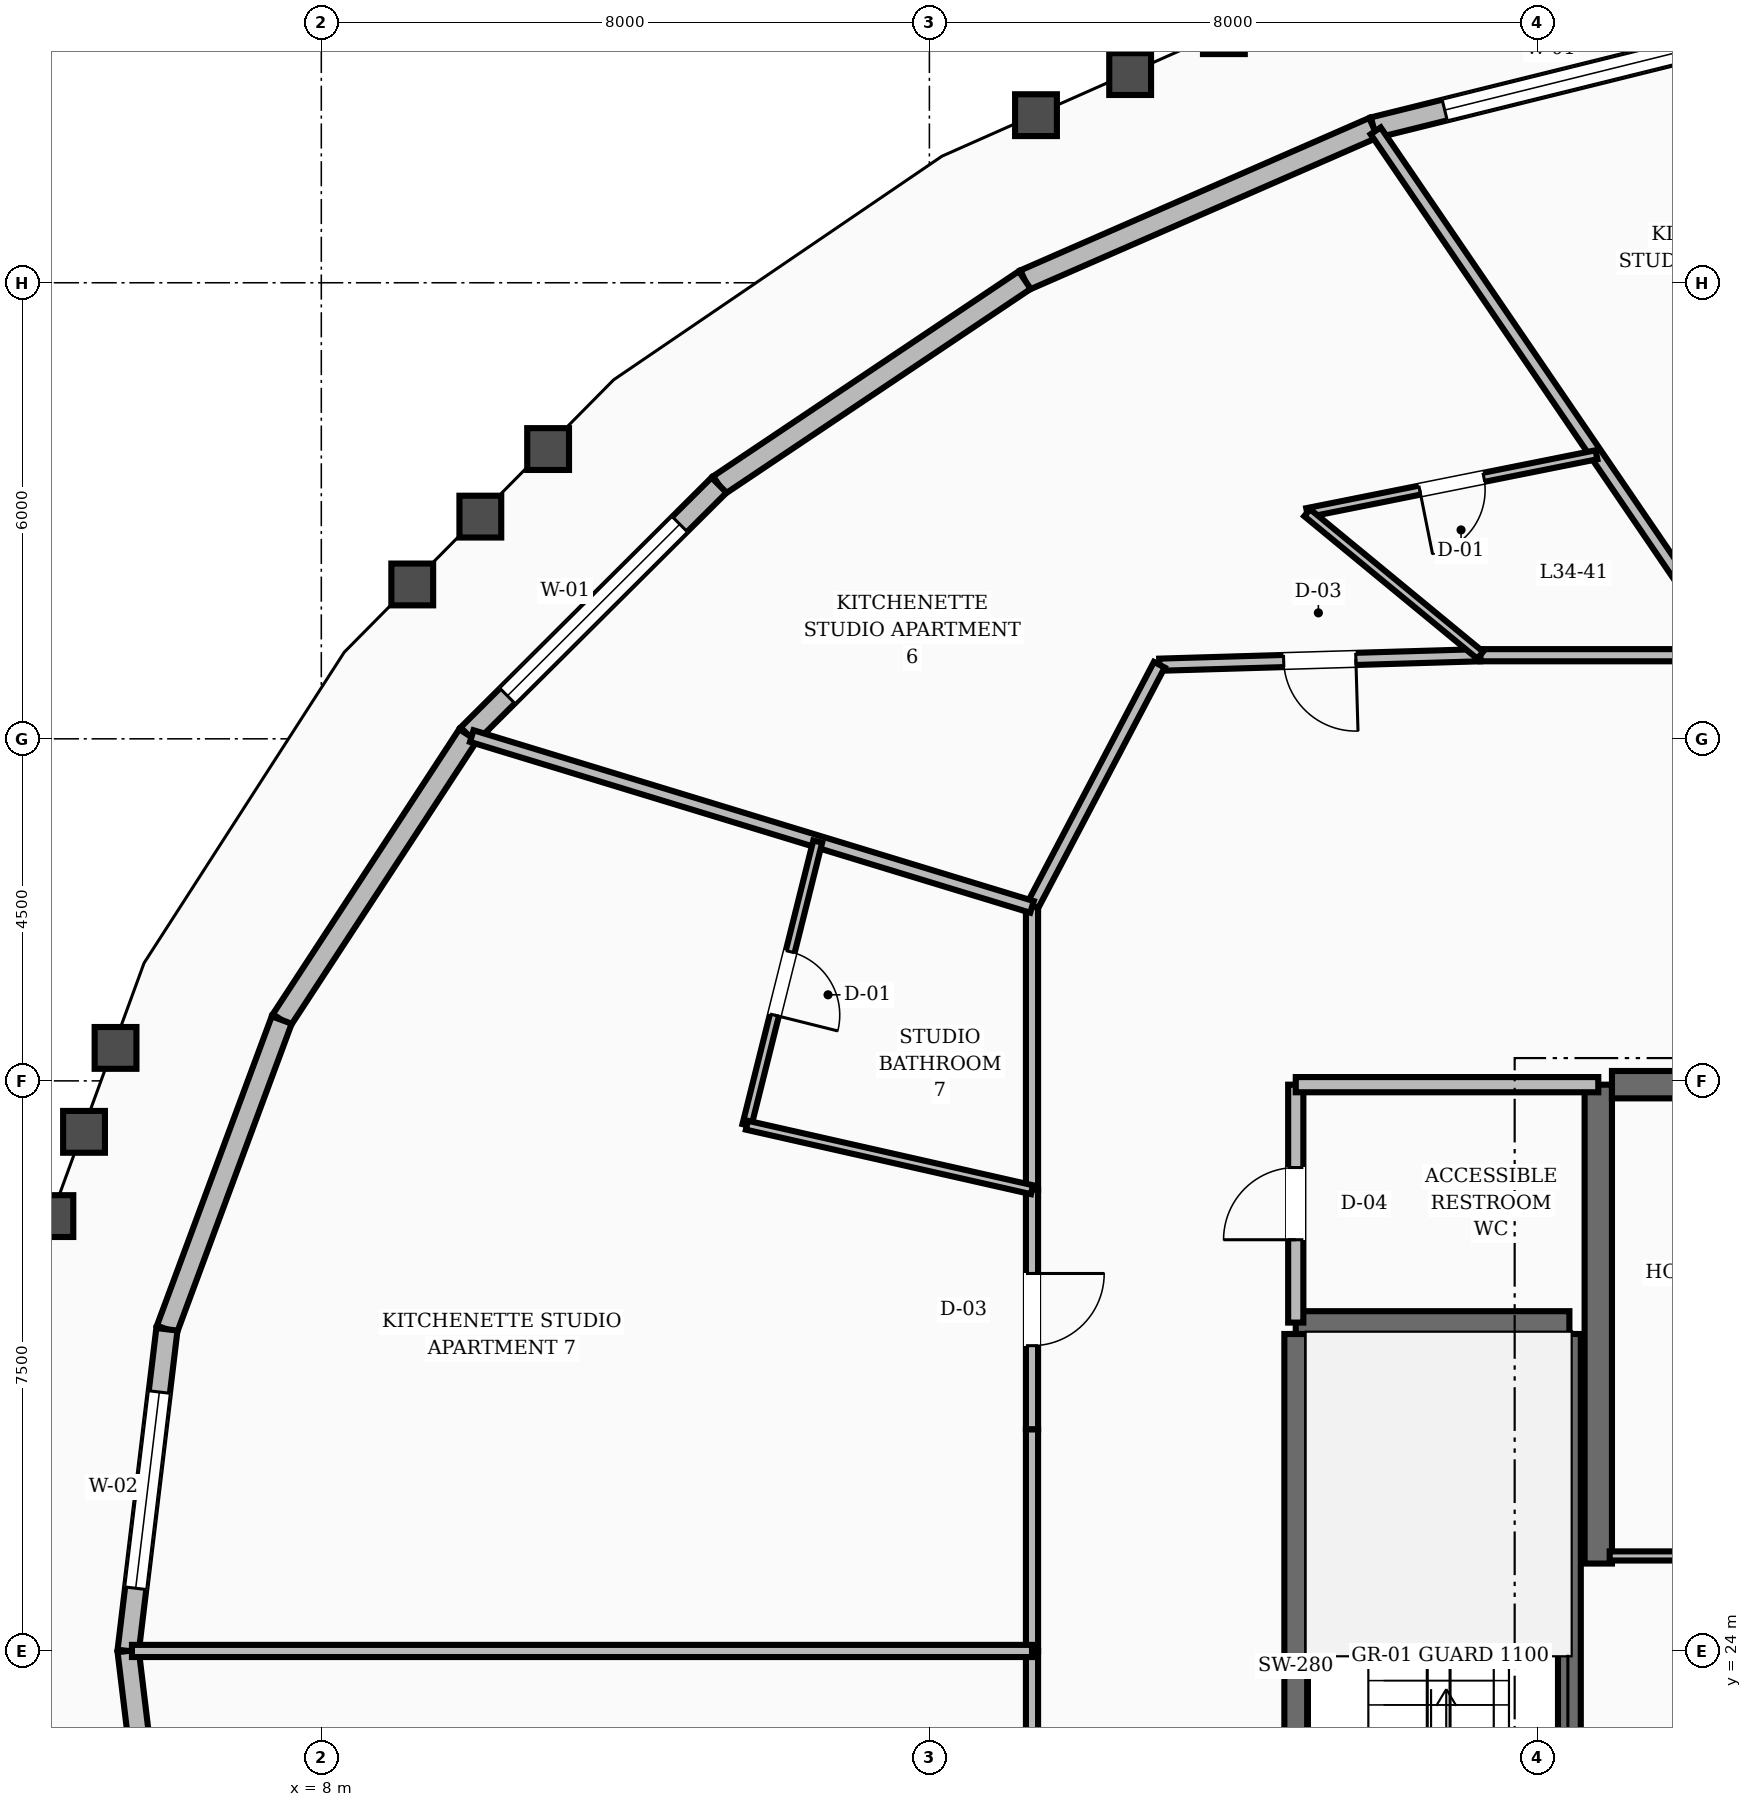
"""IFC4 building model, lengths in metres.
Left out: names, types, materials, properties, quantities, classifications, styles, units other than length and angle.
Written with IfcOpenShell. Run it as: python <this file> out.ifc"""

import sys

from ifc_helpers import new_model, si_unit, direction, frame, frame_2d, origin, place, context, subcontext, project, spatial, rectangle, extrude, element, fill, save


model = new_model("IFC4")
c1 = context("Model", 3, precision=1e-05, world=origin(), true_north=direction((0.0, 1.0)))
c2 = subcontext(c1, "Body", "Model", "MODEL_VIEW")
j1 = project(units=[si_unit("LENGTHUNIT", "METRE"), si_unit("PLANEANGLEUNIT", "RADIAN")], contexts=[c1])
p1 = place(None, origin())
s1 = spatial("IfcSite", under=j1, at=p1, CompositionType="ELEMENT")
p2 = place(p1, origin())
s2 = spatial("IfcBuilding", under=s1, at=p2, CompositionType="ELEMENT")
p3 = place(p2, frame((0.0, 0.0, 135.2)))
s3 = spatial("IfcBuildingStorey", under=s2, at=p3, CompositionType="ELEMENT", Elevation=135.2)
p4 = place(p3, frame((24.8, 25.15, 0.0), z_axis=(0.0, 0.0, 1.0), x_axis=(0.0, 1.0, 0.0)))
e1 = element("IfcWall", 1, at=p4, inside=s3, PredefinedType="SHEAR", context=c2, shape_type="SweptSolid", body=[
    extrude(rectangle(XDim=6.3, YDim=0.36, at=frame_2d((3.15, 0.0))), origin(), (0.0, 0.0, 1.0), 3.6),
])
p5 = place(p3, frame((24.98, 31.45, 0.0), z_axis=(0.0, 0.0, 1.0), x_axis=(1.0, 0.0, 0.0)))
e2 = element("IfcWall", 2, at=p5, inside=s3, PredefinedType="SHEAR", context=c2, shape_type="SweptSolid", body=[
    extrude(rectangle(XDim=3.22, YDim=0.36, at=frame_2d((1.61, 0.0))), origin(), (0.0, 0.0, 1.0), 3.6),
])
for number, where, z_axis, x_axis in (
    (3, (20.82, 19.43, 0.0), (0.0, 0.0, 1.0), (0.0, 1.0, 0.0)),
    (4, (24.42, 19.43, 0.0), (0.0, 0.0, 1.0), (0.0, 1.0, 0.0)),
):
    element("IfcWall", number, at=place(p3, frame(where, z_axis=z_axis, x_axis=x_axis)), inside=s3, PredefinedType="SHEAR", context=c2, shape_type="SweptSolid", body=[
        extrude(rectangle(XDim=8.74, YDim=0.3, at=frame_2d((4.37, 0.0))), origin(), (0.0, 0.0, 1.0), 3.6),
    ])
p6 = place(p3, frame((20.82, 28.32, 0.0), z_axis=(0.0, 0.0, 1.0), x_axis=(1.0, 0.0, 0.0)))
e5 = element("IfcWall", 5, at=p6, inside=s3, PredefinedType="SHEAR", context=c2, shape_type="SweptSolid", body=[
    extrude(rectangle(XDim=3.6, YDim=0.3, at=frame_2d((1.8, 0.0))), origin(), (0.0, 0.0, 1.0), 3.6),
])
p7 = place(p3, frame((26.822, 45.274, 0.0), z_axis=(0.0, 0.0, 1.0), x_axis=(-0.970616564694, -0.240631428415, 0.0)))
e6 = element("IfcWall", 6, at=p7, inside=s3, PredefinedType="STANDARD", context=c2, shape_type="SweptSolid", body=[
    extrude(rectangle(XDim=5.13, YDim=0.28, at=frame_2d((2.565, 0.0))), origin(), (0.0, 0.0, 1.0), 2.82),
])
p8 = place(p7, frame((0.965, 0.0, 0.8)))
e7 = element("IfcOpeningElement", 7, at=p8, cuts=e6, PredefinedType="OPENING", context=c2, shape_type="SweptSolid", body=[
    extrude(rectangle(XDim=3.2, YDim=1.65, at=frame_2d((1.6, 0.825))), frame((0.0, 0.15, 0.0), z_axis=(0.0, -1.0, 0.0), x_axis=(1.0, 0.0, 0.0)), (0.0, 0.0, 1.0), 0.3),
])
p9 = place(p3, frame((21.843, 44.04, 0.0), z_axis=(0.0, 0.0, 1.0), x_axis=(-0.916386582237, -0.400294431507, 0.0)))
e8 = element("IfcWall", 8, at=p9, inside=s3, PredefinedType="STANDARD", context=c2, shape_type="SweptSolid", body=[
    extrude(rectangle(XDim=5.007, YDim=0.28, at=frame_2d((2.504, 0.0))), origin(), (0.0, 0.0, 1.0), 2.82),
])
p10 = place(p3, frame((17.254, 42.035, 0.0), z_axis=(0.0, 0.0, 1.0), x_axis=(-0.830503660309, -0.557013168797, 0.0)))
e9 = element("IfcWall", 9, at=p10, inside=s3, PredefinedType="STANDARD", context=c2, shape_type="SweptSolid", body=[
    extrude(rectangle(XDim=4.843, YDim=0.28, at=frame_2d((2.421, 0.0))), origin(), (0.0, 0.0, 1.0), 2.82),
])
p11 = place(p3, frame((13.232, 39.338, 0.0), z_axis=(0.0, 0.0, 1.0), x_axis=(-0.708572716766, -0.705637800188, 0.0)))
e10 = element("IfcWall", 10, at=p11, inside=s3, PredefinedType="STANDARD", context=c2, shape_type="SweptSolid", body=[
    extrude(rectangle(XDim=4.658, YDim=0.28, at=frame_2d((2.329, 0.0))), origin(), (0.0, 0.0, 1.0), 2.82),
])
p12 = place(p11, frame((0.729, 0.0, 0.8)))
e11 = element("IfcOpeningElement", 11, at=p12, cuts=e10, PredefinedType="OPENING", context=c2, shape_type="SweptSolid", body=[
    extrude(rectangle(XDim=3.2, YDim=1.65, at=frame_2d((1.6, 0.825))), frame((0.0, 0.15, 0.0), z_axis=(0.0, -1.0, 0.0), x_axis=(1.0, 0.0, 0.0)), (0.0, 0.0, 1.0), 0.3),
])
p13 = place(p3, frame((9.932, 36.051, 0.0), z_axis=(0.0, 0.0, 1.0), x_axis=(-0.547360926274, -0.83689665813, 0.0)))
e12 = element("IfcWall", 12, at=p13, inside=s3, PredefinedType="STANDARD", context=c2, shape_type="SweptSolid", body=[
    extrude(rectangle(XDim=4.481, YDim=0.28, at=frame_2d((2.24, 0.0))), origin(), (0.0, 0.0, 1.0), 2.82),
])
p14 = place(p3, frame((7.479, 32.301, 0.0), z_axis=(0.0, 0.0, 1.0), x_axis=(-0.347959140817, -0.937509699321, 0.0)))
e13 = element("IfcWall", 13, at=p14, inside=s3, PredefinedType="STANDARD", context=c2, shape_type="SweptSolid", body=[
    extrude(rectangle(XDim=4.34, YDim=0.28, at=frame_2d((2.17, 0.0))), origin(), (0.0, 0.0, 1.0), 2.82),
])
p15 = place(p3, frame((5.969, 28.232, 0.0), z_axis=(0.0, 0.0, 1.0), x_axis=(-0.119655655781, -0.992815453163, 0.0)))
e14 = element("IfcWall", 14, at=p15, inside=s3, PredefinedType="STANDARD", context=c2, shape_type="SweptSolid", body=[
    extrude(rectangle(XDim=4.262, YDim=0.28, at=frame_2d((2.131, 0.0))), origin(), (0.0, 0.0, 1.0), 2.82),
])
p16 = place(p15, frame((0.831, 0.0, 0.8)))
e15 = element("IfcOpeningElement", 15, at=p16, cuts=e14, PredefinedType="OPENING", context=c2, shape_type="SweptSolid", body=[
    extrude(rectangle(XDim=2.6, YDim=1.65, at=frame_2d((1.3, 0.825))), frame((0.0, 0.15, 0.0), z_axis=(0.0, -1.0, 0.0), x_axis=(1.0, 0.0, 0.0)), (0.0, 0.0, 1.0), 0.3),
])
p17 = place(p3, frame((5.459, 24.0, 0.0), z_axis=(0.0, 0.0, 1.0), x_axis=(0.119655655781, -0.992815453163, 0.0)))
e16 = element("IfcWall", 16, at=p17, inside=s3, PredefinedType="STANDARD", context=c2, shape_type="SweptSolid", body=[
    extrude(rectangle(XDim=4.262, YDim=0.28, at=frame_2d((2.131, 0.0))), origin(), (0.0, 0.0, 1.0), 2.82),
])
p18 = place(p3, frame((20.82, 28.32, 0.0), z_axis=(0.0, 0.0, 1.0), x_axis=(0.0, 1.0, 0.0)))
e17 = element("IfcWall", 17, at=p18, inside=s3, PredefinedType="SOLIDWALL", context=c2, shape_type="SweptSolid", body=[
    extrude(rectangle(XDim=3.13, YDim=0.2, at=frame_2d((1.565, 0.0))), origin(), (0.0, 0.0, 1.0), 2.8),
])
p19 = place(p18, frame((1.09, 0.0, 0.0)))
e18 = element("IfcOpeningElement", 18, at=p19, cuts=e17, PredefinedType="OPENING", context=c2, shape_type="SweptSolid", body=[
    extrude(rectangle(XDim=0.95, YDim=2.1, at=frame_2d((0.475, 1.05))), frame((0.0, 0.11, 0.0), z_axis=(0.0, -1.0, 0.0), x_axis=(1.0, 0.0, 0.0)), (0.0, 0.0, 1.0), 0.22),
])
p20 = place(p3, frame((20.82, 31.45, 0.0), z_axis=(0.0, 0.0, 1.0), x_axis=(1.0, 0.0, 0.0)))
e19 = element("IfcWall", 19, at=p20, inside=s3, PredefinedType="SOLIDWALL", context=c2, shape_type="SweptSolid", body=[
    extrude(rectangle(XDim=3.98, YDim=0.2, at=frame_2d((1.99, 0.0))), origin(), (0.0, 0.0, 1.0), 2.8),
])
p21 = place(p3, frame((24.95, 25.25, 0.0), z_axis=(0.0, 0.0, 1.0), x_axis=(1.0, 0.0, 0.0)))
e20 = element("IfcWall", 20, at=p21, inside=s3, PredefinedType="PARTITIONING", context=c2, shape_type="SweptSolid", body=[
    extrude(rectangle(XDim=3.2, YDim=0.12, at=frame_2d((1.6, 0.0))), origin(), (0.0, 0.0, 1.0), 2.8),
])
p22 = place(p21, frame((1.125, 0.0, 0.0)))
e21 = element("IfcOpeningElement", 21, at=p22, cuts=e20, PredefinedType="OPENING", context=c2, shape_type="SweptSolid", body=[
    extrude(rectangle(XDim=0.95, YDim=2.1, at=frame_2d((0.475, 1.05))), frame((0.0, 0.07, 0.0), z_axis=(0.0, -1.0, 0.0), x_axis=(1.0, 0.0, 0.0)), (0.0, 0.0, 1.0), 0.14),
])
p23 = place(p3, frame((26.574, 37.1, 0.0), z_axis=(0.0, 0.0, 1.0), x_axis=(-1.0, 0.0, 0.0)))
e22 = element("IfcWall", 22, at=p23, inside=s3, PredefinedType="SOLIDWALL", context=c2, shape_type="SweptSolid", body=[
    extrude(rectangle(XDim=3.327, YDim=0.16, at=frame_2d((1.664, 0.0))), origin(), (0.0, 0.0, 1.0), 2.8),
])
p24 = place(p3, frame((23.247, 37.1, 0.0), z_axis=(0.0, 0.0, 1.0), x_axis=(-0.999561990195, -0.029594387265, 0.0)))
e23 = element("IfcWall", 23, at=p24, inside=s3, PredefinedType="SOLIDWALL", context=c2, shape_type="SweptSolid", body=[
    extrude(rectangle(XDim=4.224, YDim=0.16, at=frame_2d((2.112, 0.0))), origin(), (0.0, 0.0, 1.0), 2.8),
])
p25 = place(p24, frame((1.637, 0.0, 0.0)))
e24 = element("IfcOpeningElement", 24, at=p25, cuts=e23, PredefinedType="OPENING", context=c2, shape_type="SweptSolid", body=[
    extrude(rectangle(XDim=0.95, YDim=2.1, at=frame_2d((0.475, 1.05))), frame((0.0, 0.09, 0.0), z_axis=(0.0, -1.0, 0.0), x_axis=(1.0, 0.0, 0.0)), (0.0, 0.0, 1.0), 0.18),
])
p26 = place(p3, frame((19.025, 36.975, 0.0), z_axis=(0.0, 0.0, 1.0), x_axis=(-0.46527115782, -0.885168204185, 0.0)))
e25 = element("IfcWall", 25, at=p26, inside=s3, PredefinedType="SOLIDWALL", context=c2, shape_type="SweptSolid", body=[
    extrude(rectangle(XDim=3.6, YDim=0.16, at=frame_2d((1.8, 0.0))), origin(), (0.0, 0.0, 1.0), 2.8),
])
p27 = place(p3, frame((17.35, 33.789, 0.0), z_axis=(0.0, 0.0, 1.0), x_axis=(0.0, -1.0, 0.0)))
e26 = element("IfcWall", 26, at=p27, inside=s3, PredefinedType="SOLIDWALL", context=c2, shape_type="SweptSolid", body=[
    extrude(rectangle(XDim=3.721, YDim=0.16, at=frame_2d((1.86, 0.0))), origin(), (0.0, 0.0, 1.0), 2.8),
])
p28 = place(p3, frame((17.35, 30.068, 0.0), z_axis=(0.0, 0.0, 1.0), x_axis=(0.0, -1.0, 0.0)))
e27 = element("IfcWall", 27, at=p28, inside=s3, PredefinedType="SOLIDWALL", context=c2, shape_type="SweptSolid", body=[
    extrude(rectangle(XDim=3.154, YDim=0.16, at=frame_2d((1.577, 0.0))), origin(), (0.0, 0.0, 1.0), 2.8),
])
p29 = place(p28, frame((1.102, 0.0, 0.0)))
e28 = element("IfcOpeningElement", 28, at=p29, cuts=e27, PredefinedType="OPENING", context=c2, shape_type="SweptSolid", body=[
    extrude(rectangle(XDim=0.95, YDim=2.1, at=frame_2d((0.475, 1.05))), frame((0.0, 0.09, 0.0), z_axis=(0.0, -1.0, 0.0), x_axis=(1.0, 0.0, 0.0)), (0.0, 0.0, 1.0), 0.18),
])
for number, where, z_axis, x_axis in (
    (29, (17.35, 26.914, 0.0), (0.0, 0.0, 1.0), (0.0, -1.0, 0.0)),
    (30, (17.35, 24.0, 0.0), (0.0, 0.0, 1.0), (0.0, -1.0, 0.0)),
):
    element("IfcWall", number, at=place(p3, frame(where, z_axis=z_axis, x_axis=x_axis)), inside=s3, PredefinedType="SOLIDWALL", context=c2, shape_type="SweptSolid", body=[
        extrude(rectangle(XDim=2.914, YDim=0.16, at=frame_2d((1.457, 0.0))), origin(), (0.0, 0.0, 1.0), 2.8),
    ])
p30 = place(p3, frame((26.574, 37.1, 0.0), z_axis=(0.0, 0.0, 1.0), x_axis=(-0.563247896503, 0.826287968619, 0.0)))
e31 = element("IfcWall", 31, at=p30, inside=s3, PredefinedType="SOLIDWALL", context=c2, shape_type="SweptSolid", body=[
    extrude(rectangle(XDim=8.349, YDim=0.16, at=frame_2d((4.174, 0.0))), origin(), (0.0, 0.0, 1.0), 2.8),
])
p31 = place(p3, frame((24.776, 39.737, 0.0), z_axis=(0.0, 0.0, 1.0), x_axis=(-0.980558899125, -0.196224986548, 0.0)))
e32 = element("IfcWall", 32, at=p31, inside=s3, PredefinedType="PARTITIONING", context=c2, shape_type="SweptSolid", body=[
    extrude(rectangle(XDim=3.882, YDim=0.12, at=frame_2d((1.941, 0.0))), origin(), (0.0, 0.0, 1.0), 2.8),
])
p32 = place(p31, frame((1.511, 0.0, 0.0)))
e33 = element("IfcOpeningElement", 33, at=p32, cuts=e32, PredefinedType="OPENING", context=c2, shape_type="SweptSolid", body=[
    extrude(rectangle(XDim=0.86, YDim=2.1, at=frame_2d((0.43, 1.05))), frame((0.0, 0.07, 0.0), z_axis=(0.0, -1.0, 0.0), x_axis=(1.0, 0.0, 0.0)), (0.0, 0.0, 1.0), 0.14),
])
p33 = place(p3, frame((23.247, 37.1, 0.0), z_axis=(0.0, 0.0, 1.0), x_axis=(-0.771932624653, 0.635704351877, 0.0)))
e34 = element("IfcWall", 34, at=p33, inside=s3, PredefinedType="PARTITIONING", context=c2, shape_type="SweptSolid", body=[
    extrude(rectangle(XDim=2.95, YDim=0.12, at=frame_2d((1.475, 0.0))), origin(), (0.0, 0.0, 1.0), 2.8),
])
p34 = place(p3, frame((17.35, 33.789, 0.0), z_axis=(0.0, 0.0, 1.0), x_axis=(-0.95652602868, 0.291646972309, 0.0)))
e35 = element("IfcWall", 35, at=p34, inside=s3, PredefinedType="SOLIDWALL", context=c2, shape_type="SweptSolid", body=[
    extrude(rectangle(XDim=7.706, YDim=0.16, at=frame_2d((3.853, 0.0))), origin(), (0.0, 0.0, 1.0), 2.8),
])
p35 = place(p3, frame((14.531, 34.648, 0.0), z_axis=(0.0, 0.0, 1.0), x_axis=(-0.2422667996, -0.970209666934, 0.0)))
e36 = element("IfcWall", 36, at=p35, inside=s3, PredefinedType="PARTITIONING", context=c2, shape_type="SweptSolid", body=[
    extrude(rectangle(XDim=3.846, YDim=0.12, at=frame_2d((1.923, 0.0))), origin(), (0.0, 0.0, 1.0), 2.8),
])
p36 = place(p35, frame((1.493, 0.0, 0.0)))
e37 = element("IfcOpeningElement", 37, at=p36, cuts=e36, PredefinedType="OPENING", context=c2, shape_type="SweptSolid", body=[
    extrude(rectangle(XDim=0.86, YDim=2.1, at=frame_2d((0.43, 1.05))), frame((0.0, 0.07, 0.0), z_axis=(0.0, -1.0, 0.0), x_axis=(1.0, 0.0, 0.0)), (0.0, 0.0, 1.0), 0.14),
])
p37 = place(p3, frame((17.35, 30.068, 0.0), z_axis=(0.0, 0.0, 1.0), x_axis=(-0.975363063608, 0.220605743689, 0.0)))
e38 = element("IfcWall", 38, at=p37, inside=s3, PredefinedType="PARTITIONING", context=c2, shape_type="SweptSolid", body=[
    extrude(rectangle(XDim=3.846, YDim=0.12, at=frame_2d((1.923, 0.0))), origin(), (0.0, 0.0, 1.0), 2.8),
])
p38 = place(p3, frame((17.35, 24.0, 0.0), z_axis=(0.0, 0.0, 1.0), x_axis=(-1.0, 0.0, 0.0)))
e39 = element("IfcWall", 39, at=p38, inside=s3, PredefinedType="SOLIDWALL", context=c2, shape_type="SweptSolid", body=[
    extrude(rectangle(XDim=11.841, YDim=0.16, at=frame_2d((5.921, 0.0))), origin(), (0.0, 0.0, 1.0), 2.8),
])
p39 = place(p8, origin())
e40 = element("IfcWindow", 40, at=p39, inside=s3, PartitioningType="SINGLE_PANEL", PredefinedType="WINDOW", context=c2, shape_type="SweptSolid", body=[
    extrude(rectangle(XDim=3.2, YDim=1.65, at=frame_2d((1.6, 0.825))), frame((0.0, 0.03, 0.0), z_axis=(0.0, -1.0, 0.0), x_axis=(1.0, 0.0, 0.0)), (0.0, 0.0, 1.0), 0.06),
])
fill(e7, e40)
p40 = place(p12, origin())
e41 = element("IfcWindow", 41, at=p40, inside=s3, PartitioningType="SINGLE_PANEL", PredefinedType="WINDOW", context=c2, shape_type="SweptSolid", body=[
    extrude(rectangle(XDim=3.2, YDim=1.65, at=frame_2d((1.6, 0.825))), frame((0.0, 0.03, 0.0), z_axis=(0.0, -1.0, 0.0), x_axis=(1.0, 0.0, 0.0)), (0.0, 0.0, 1.0), 0.06),
])
fill(e11, e41)
p41 = place(p16, origin())
e42 = element("IfcWindow", 42, at=p41, inside=s3, PartitioningType="SINGLE_PANEL", PredefinedType="WINDOW", context=c2, shape_type="SweptSolid", body=[
    extrude(rectangle(XDim=2.6, YDim=1.65, at=frame_2d((1.3, 0.825))), frame((0.0, 0.03, 0.0), z_axis=(0.0, -1.0, 0.0), x_axis=(1.0, 0.0, 0.0)), (0.0, 0.0, 1.0), 0.06),
])
fill(e15, e42)
p42 = place(p19, origin())
e43 = element("IfcDoor", 43, at=p42, inside=s3, OperationType="SINGLE_SWING_LEFT", PredefinedType="DOOR", context=c2, shape_type="SweptSolid", body=[
    extrude(rectangle(XDim=0.95, YDim=2.1, at=frame_2d((0.475, 1.05))), frame((0.0, 0.025, 0.0), z_axis=(0.0, -1.0, 0.0), x_axis=(1.0, 0.0, 0.0)), (0.0, 0.0, 1.0), 0.05),
])
fill(e18, e43)
p43 = place(p32, origin())
e44 = element("IfcDoor", 44, at=p43, inside=s3, OperationType="SINGLE_SWING_RIGHT", PredefinedType="DOOR", context=c2, shape_type="SweptSolid", body=[
    extrude(rectangle(XDim=0.86, YDim=2.1, at=frame_2d((0.43, 1.05))), frame((0.0, 0.025, 0.0), z_axis=(0.0, -1.0, 0.0), x_axis=(1.0, 0.0, 0.0)), (0.0, 0.0, 1.0), 0.05),
])
fill(e33, e44)
p44 = place(p25, origin())
e45 = element("IfcDoor", 45, at=p44, inside=s3, OperationType="SINGLE_SWING_LEFT", PredefinedType="DOOR", context=c2, shape_type="SweptSolid", body=[
    extrude(rectangle(XDim=0.95, YDim=2.1, at=frame_2d((0.475, 1.05))), frame((0.0, 0.025, 0.0), z_axis=(0.0, -1.0, 0.0), x_axis=(1.0, 0.0, 0.0)), (0.0, 0.0, 1.0), 0.05),
])
fill(e24, e45)
p45 = place(p36, origin())
e46 = element("IfcDoor", 46, at=p45, inside=s3, OperationType="SINGLE_SWING_RIGHT", PredefinedType="DOOR", context=c2, shape_type="SweptSolid", body=[
    extrude(rectangle(XDim=0.86, YDim=2.1, at=frame_2d((0.43, 1.05))), frame((0.0, 0.025, 0.0), z_axis=(0.0, -1.0, 0.0), x_axis=(1.0, 0.0, 0.0)), (0.0, 0.0, 1.0), 0.05),
])
fill(e37, e46)
p46 = place(p29, origin())
e47 = element("IfcDoor", 47, at=p46, inside=s3, OperationType="SINGLE_SWING_LEFT", PredefinedType="DOOR", context=c2, shape_type="SweptSolid", body=[
    extrude(rectangle(XDim=0.95, YDim=2.1, at=frame_2d((0.475, 1.05))), frame((0.0, 0.025, 0.0), z_axis=(0.0, -1.0, 0.0), x_axis=(1.0, 0.0, 0.0)), (0.0, 0.0, 1.0), 0.05),
])
fill(e28, e47)
save(model, sys.argv[1])
